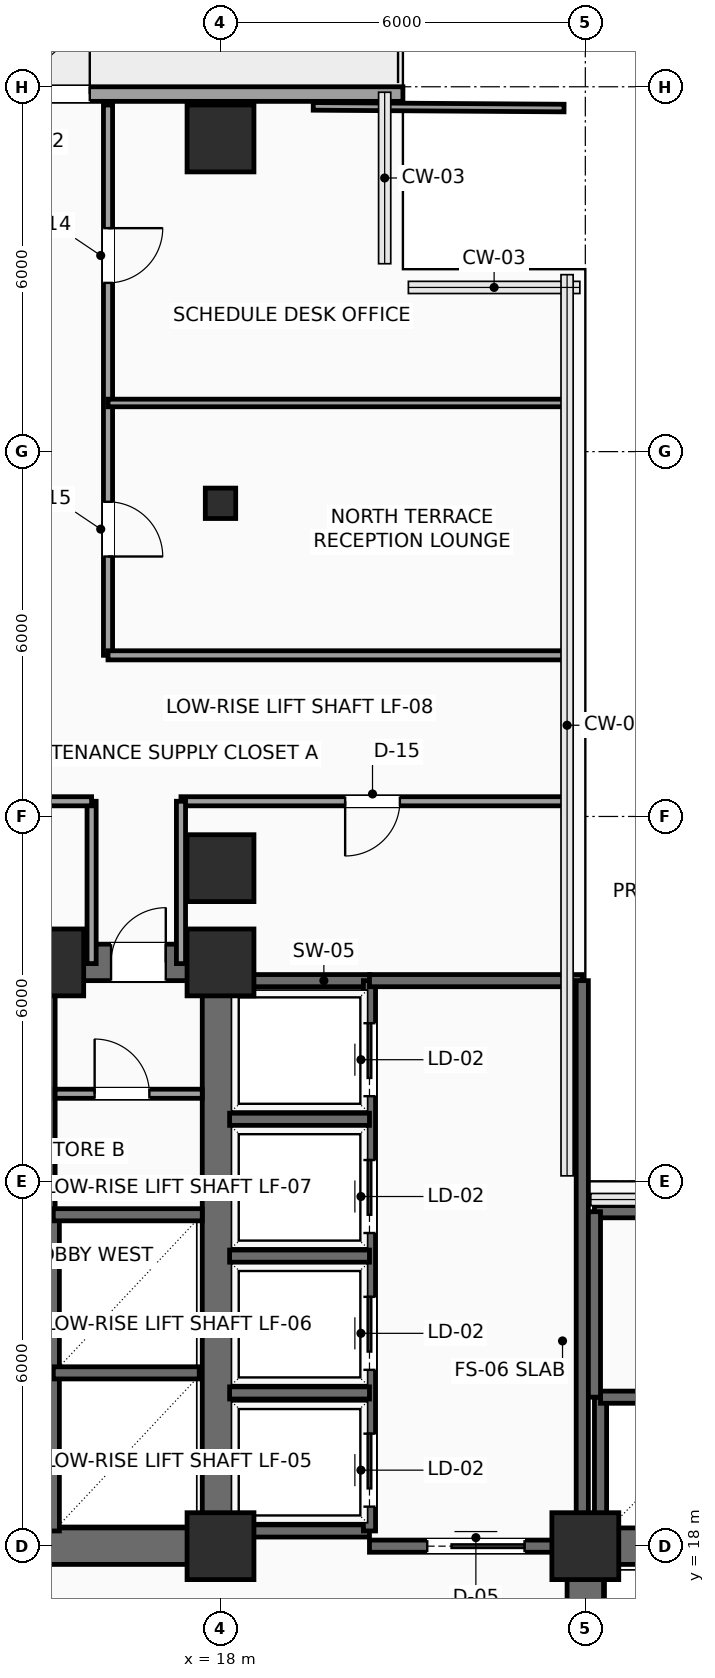
"""IFC4 building model, lengths in metres.
Left out: names, types, materials, properties, quantities, classifications, styles, units other than length and angle.
Written with IfcOpenShell. Run it as: python <this file> out.ifc"""

import sys

from ifc_helpers import new_model, si_unit, direction, frame, frame_2d, origin, origin_2d, place, context, subcontext, project, spatial, rectangle, hollow_rectangle, extrude, element, fill, save


model = new_model("IFC4")
c1 = context("Model", 3, precision=1e-05, world=origin(), true_north=direction((0.0, 1.0)))
c2 = subcontext(c1, "Body", "Model", "MODEL_VIEW")
j1 = project(units=[si_unit("LENGTHUNIT", "METRE"), si_unit("PLANEANGLEUNIT", "RADIAN")], contexts=[c1])
p1 = place(None, origin())
s1 = spatial("IfcSite", under=j1, at=p1, CompositionType="ELEMENT")
p2 = place(p1, origin())
s2 = spatial("IfcBuilding", under=s1, at=p2, CompositionType="ELEMENT")
p3 = place(p2, frame((0.0, 0.0, 99.6)))
s3 = spatial("IfcBuildingStorey", under=s2, at=p3, CompositionType="ELEMENT", Elevation=99.6)
for number, where, z_axis, x_axis in (
    (1, (18.0, 18.0, 0.0), (0.0, 0.0, 1.0), (1.0, 0.0, 0.0)),
    (2, (15.2, 27.6, 0.0), (0.0, 0.0, 1.0), (1.0, 0.0, 0.0)),
    (3, (18.0, 27.6, 0.0), (0.0, 0.0, 1.0), (1.0, 0.0, 0.0)),
    (4, (24.0, 18.0, 0.0), (0.0, 0.0, 1.0), (1.0, 0.0, 0.0)),
    (5, (18.0, 29.15, 0.0), (0.0, 0.0, 1.0), (1.0, 0.0, 0.0)),
):
    element("IfcColumn", number, at=place(p3, frame(where, z_axis=z_axis, x_axis=x_axis)), inside=s3, PredefinedType="COLUMN", context=c2, shape_type="SweptSolid", body=[
        extrude(rectangle(XDim=1.1, YDim=1.1, at=origin_2d()), origin(), (0.0, 0.0, 1.0), 3.75),
    ])
p4 = place(p3, frame((18.0, 35.15, 0.0), z_axis=(0.0, 0.0, 1.0), x_axis=(1.0, 0.0, 0.0)))
e6 = element("IfcColumn", 6, at=p4, inside=s3, PredefinedType="COLUMN", context=c2, shape_type="SweptSolid", body=[
    extrude(hollow_rectangle(XDim=0.5, YDim=0.5, WallThickness=0.025, InnerFilletRadius=0.025, OuterFilletRadius=0.04, at=origin_2d()), origin(), (0.0, 0.0, 1.0), 3.75),
])
p5 = place(p3, frame((18.0, 41.15, 0.0), z_axis=(0.0, 0.0, 1.0), x_axis=(1.0, 0.0, 0.0)))
e7 = element("IfcColumn", 7, at=p5, inside=s3, PredefinedType="COLUMN", context=c2, shape_type="SweptSolid", body=[
    extrude(rectangle(XDim=1.1, YDim=1.1, at=origin_2d()), origin(), (0.0, 0.0, 1.0), 3.75),
])
p6 = place(p3, frame((3.0, 41.88, 0.0), z_axis=(0.0, 0.0, 1.0), x_axis=(1.0, 0.0, 0.0)))
e8 = element("IfcWall", 8, at=p6, inside=s3, PredefinedType="SOLIDWALL", context=c2, shape_type="SweptSolid", body=[
    extrude(rectangle(XDim=18.0, YDim=0.24, at=frame_2d((9.0, 0.0))), origin(), (0.0, 0.0, 1.0), 3.525),
])
p7 = place(p6, frame((11.05, 0.0, 0.0)))
e9 = element("IfcOpeningElement", 9, at=p7, cuts=e8, PredefinedType="OPENING", context=c2, shape_type="SweptSolid", body=[
    extrude(rectangle(XDim=1.8, YDim=2.4, at=frame_2d((0.9, 1.2))), frame((0.0, 0.13, 0.0), z_axis=(0.0, -1.0, 0.0), x_axis=(1.0, 0.0, 0.0)), (0.0, 0.0, 1.0), 0.26),
])
p8 = place(p3, frame((6.0, 18.0, 0.0), z_axis=(0.0, 0.0, 1.0), x_axis=(1.0, 0.0, 0.0)))
e10 = element("IfcWall", 10, at=p8, inside=s3, PredefinedType="SHEAR", context=c2, shape_type="SweptSolid", body=[
    extrude(rectangle(XDim=12.0, YDim=0.6, at=frame_2d((6.0, 0.0))), origin(), (0.0, 0.0, 1.0), 3.525),
])
p9 = place(p8, frame((7.15, 0.0, 0.0)))
e11 = element("IfcOpeningElement", 11, at=p9, cuts=e10, PredefinedType="OPENING", context=c2, shape_type="SweptSolid", body=[
    extrude(rectangle(XDim=1.6, YDim=2.3, at=frame_2d((0.8, 1.15))), frame((0.0, 0.31, 0.0), z_axis=(0.0, -1.0, 0.0), x_axis=(1.0, 0.0, 0.0)), (0.0, 0.0, 1.0), 0.62),
])
p10 = place(p3, frame((6.0, 27.6, 0.0), z_axis=(0.0, 0.0, 1.0), x_axis=(1.0, 0.0, 0.0)))
e12 = element("IfcWall", 12, at=p10, inside=s3, PredefinedType="SHEAR", context=c2, shape_type="SweptSolid", body=[
    extrude(rectangle(XDim=12.0, YDim=0.6, at=frame_2d((6.0, 0.0))), origin(), (0.0, 0.0, 1.0), 3.525),
])
p11 = place(p10, frame((10.2, 0.0, 0.0)))
e13 = element("IfcOpeningElement", 13, at=p11, cuts=e12, PredefinedType="OPENING", context=c2, shape_type="SweptSolid", body=[
    extrude(rectangle(XDim=0.9, YDim=2.15, at=frame_2d((0.45, 1.075))), frame((0.0, 0.31, 0.0), z_axis=(0.0, -1.0, 0.0), x_axis=(1.0, 0.0, 0.0)), (0.0, 0.0, 1.0), 0.62),
])
for number, where, z_axis, x_axis in (
    (14, (18.0, 18.0, 0.0), (0.0, 0.0, 1.0), (0.0, 1.0, 0.0)),
    (15, (24.0, 18.0, 0.0), (0.0, 0.0, 1.0), (1.0, 0.0, 0.0)),
):
    element("IfcWall", number, at=place(p3, frame(where, z_axis=z_axis, x_axis=x_axis)), inside=s3, PredefinedType="SHEAR", context=c2, shape_type="SweptSolid", body=[
        extrude(rectangle(XDim=9.6, YDim=0.6, at=frame_2d((4.8, 0.0))), origin(), (0.0, 0.0, 1.0), 3.525),
    ])
p12 = place(p3, frame((24.0, 6.0, 0.0), z_axis=(0.0, 0.0, 1.0), x_axis=(0.0, 1.0, 0.0)))
e16 = element("IfcWall", 16, at=p12, inside=s3, PredefinedType="SHEAR", context=c2, shape_type="SweptSolid", body=[
    extrude(rectangle(XDim=12.0, YDim=0.6, at=frame_2d((6.0, 0.0))), origin(), (0.0, 0.0, 1.0), 3.525),
])
p13 = place(p12, frame((7.15, 0.0, 0.0)))
e17 = element("IfcOpeningElement", 17, at=p13, cuts=e16, PredefinedType="OPENING", context=c2, shape_type="SweptSolid", body=[
    extrude(rectangle(XDim=1.6, YDim=2.3, at=frame_2d((0.8, 1.15))), frame((0.0, 0.31, 0.0), z_axis=(0.0, -1.0, 0.0), x_axis=(1.0, 0.0, 0.0)), (0.0, 0.0, 1.0), 0.62),
])
p14 = place(p3, frame((15.18, 23.26, 0.0), z_axis=(0.0, 0.0, 1.0), x_axis=(0.0, 1.0, 0.0)))
e18 = element("IfcWall", 18, at=p14, inside=s3, PredefinedType="SHEAR", context=c2, shape_type="SweptSolid", body=[
    extrude(rectangle(XDim=4.04, YDim=0.2, at=frame_2d((2.02, 0.0))), origin(), (0.0, 0.0, 1.0), 3.525),
])
p15 = place(p3, frame((15.25, 18.25, 0.0), z_axis=(0.0, 0.0, 1.0), x_axis=(0.0, 1.0, 0.0)))
e19 = element("IfcWall", 19, at=p15, inside=s3, PredefinedType="SHEAR", context=c2, shape_type="SweptSolid", body=[
    extrude(rectangle(XDim=5.2, YDim=0.2, at=frame_2d((2.6, 0.0))), origin(), (0.0, 0.0, 1.0), 3.525),
])
p16 = place(p3, frame((15.25, 20.85, 0.0), z_axis=(0.0, 0.0, 1.0), x_axis=(1.0, 0.0, 0.0)))
e20 = element("IfcWall", 20, at=p16, inside=s3, PredefinedType="SHEAR", context=c2, shape_type="SweptSolid", body=[
    extrude(rectangle(XDim=2.4, YDim=0.2, at=frame_2d((1.2, 0.0))), origin(), (0.0, 0.0, 1.0), 3.525),
])
p17 = place(p3, frame((15.25, 23.45, 0.0), z_axis=(0.0, 0.0, 1.0), x_axis=(1.0, 0.0, 0.0)))
e21 = element("IfcWall", 21, at=p17, inside=s3, PredefinedType="SHEAR", context=c2, shape_type="SweptSolid", body=[
    extrude(rectangle(XDim=2.45, YDim=0.2, at=frame_2d((1.225, 0.0))), origin(), (0.0, 0.0, 1.0), 3.525),
])
p18 = place(p3, frame((15.28, 25.44, 0.0), z_axis=(0.0, 0.0, 1.0), x_axis=(1.0, 0.0, 0.0)))
e22 = element("IfcWall", 22, at=p18, inside=s3, PredefinedType="PARTITIONING", context=c2, shape_type="SweptSolid", body=[
    extrude(rectangle(XDim=2.42, YDim=0.15, at=frame_2d((1.21, 0.0))), origin(), (0.0, 0.0, 1.0), 3.525),
])
p19 = place(p18, frame((0.65, 0.0, 0.0)))
e23 = element("IfcOpeningElement", 23, at=p19, cuts=e22, PredefinedType="OPENING", context=c2, shape_type="SweptSolid", body=[
    extrude(rectangle(XDim=0.9, YDim=2.15, at=frame_2d((0.45, 1.075))), frame((0.0, 0.085, 0.0), z_axis=(0.0, -1.0, 0.0), x_axis=(1.0, 0.0, 0.0)), (0.0, 0.0, 1.0), 0.17),
])
for number, where, z_axis, x_axis in (
    (24, (18.1, 27.3, 0.0), (0.0, 0.0, 1.0), (1.0, 0.0, 0.0)),
    (25, (18.1, 18.25, 0.0), (0.0, 0.0, 1.0), (1.0, 0.0, 0.0)),
):
    element("IfcWall", number, at=place(p3, frame(where, z_axis=z_axis, x_axis=x_axis)), inside=s3, PredefinedType="SHEAR", context=c2, shape_type="SweptSolid", body=[
        extrude(rectangle(XDim=2.35, YDim=0.2, at=frame_2d((1.175, 0.0))), origin(), (0.0, 0.0, 1.0), 3.525),
    ])
p20 = place(p3, frame((20.45, 18.25, 0.0), z_axis=(0.0, 0.0, 1.0), x_axis=(0.0, 1.0, 0.0)))
e26 = element("IfcWall", 26, at=p20, inside=s3, PredefinedType="SHEAR", context=c2, shape_type="SweptSolid", body=[
    extrude(rectangle(XDim=9.05, YDim=0.2, at=frame_2d((4.525, 0.0))), origin(), (0.0, 0.0, 1.0), 3.525),
])
p21 = place(p20, frame((0.4, 0.0, 0.0)))
e27 = element("IfcOpeningElement", 27, at=p21, cuts=e26, PredefinedType="OPENING", context=c2, shape_type="SweptSolid", body=[
    extrude(rectangle(XDim=1.2, YDim=2.2, at=frame_2d((0.6, 1.1))), frame((0.0, 0.11, 0.0), z_axis=(0.0, -1.0, 0.0), x_axis=(1.0, 0.0, 0.0)), (0.0, 0.0, 1.0), 0.22),
])
p22 = place(p20, frame((2.65, 0.0, 0.0)))
e28 = element("IfcOpeningElement", 28, at=p22, cuts=e26, PredefinedType="OPENING", context=c2, shape_type="SweptSolid", body=[
    extrude(rectangle(XDim=1.2, YDim=2.2, at=frame_2d((0.6, 1.1))), frame((0.0, 0.11, 0.0), z_axis=(0.0, -1.0, 0.0), x_axis=(1.0, 0.0, 0.0)), (0.0, 0.0, 1.0), 0.22),
])
p23 = place(p20, frame((4.9, 0.0, 0.0)))
e29 = element("IfcOpeningElement", 29, at=p23, cuts=e26, PredefinedType="OPENING", context=c2, shape_type="SweptSolid", body=[
    extrude(rectangle(XDim=1.2, YDim=2.2, at=frame_2d((0.6, 1.1))), frame((0.0, 0.11, 0.0), z_axis=(0.0, -1.0, 0.0), x_axis=(1.0, 0.0, 0.0)), (0.0, 0.0, 1.0), 0.22),
])
p24 = place(p20, frame((7.15, 0.0, 0.0)))
e30 = element("IfcOpeningElement", 30, at=p24, cuts=e26, PredefinedType="OPENING", context=c2, shape_type="SweptSolid", body=[
    extrude(rectangle(XDim=1.2, YDim=2.2, at=frame_2d((0.6, 1.1))), frame((0.0, 0.11, 0.0), z_axis=(0.0, -1.0, 0.0), x_axis=(1.0, 0.0, 0.0)), (0.0, 0.0, 1.0), 0.22),
])
for number, where, z_axis, x_axis in (
    (31, (18.15, 20.52, 0.0), (0.0, 0.0, 1.0), (1.0, 0.0, 0.0)),
    (32, (18.15, 22.77, 0.0), (0.0, 0.0, 1.0), (1.0, 0.0, 0.0)),
    (33, (18.15, 25.02, 0.0), (0.0, 0.0, 1.0), (1.0, 0.0, 0.0)),
):
    element("IfcWall", number, at=place(p3, frame(where, z_axis=z_axis, x_axis=x_axis)), inside=s3, PredefinedType="SHEAR", context=c2, shape_type="SweptSolid", body=[
        extrude(rectangle(XDim=2.3, YDim=0.2, at=frame_2d((1.15, 0.0))), origin(), (0.0, 0.0, 1.0), 3.525),
    ])
p25 = place(p3, frame((20.45, 18.0, 0.0), z_axis=(0.0, 0.0, 1.0), x_axis=(1.0, 0.0, 0.0)))
e34 = element("IfcWall", 34, at=p25, inside=s3, PredefinedType="SHEAR", context=c2, shape_type="SweptSolid", body=[
    extrude(rectangle(XDim=3.5, YDim=0.2, at=frame_2d((1.75, 0.0))), origin(), (0.0, 0.0, 1.0), 3.525),
])
p26 = place(p25, frame((0.95, 0.0, 0.0)))
e35 = element("IfcOpeningElement", 35, at=p26, cuts=e34, PredefinedType="OPENING", context=c2, shape_type="SweptSolid", body=[
    extrude(rectangle(XDim=1.6, YDim=2.3, at=frame_2d((0.8, 1.15))), frame((0.0, 0.11, 0.0), z_axis=(0.0, -1.0, 0.0), x_axis=(1.0, 0.0, 0.0)), (0.0, 0.0, 1.0), 0.22),
])
p27 = place(p3, frame((20.45, 27.3, 0.0), z_axis=(0.0, 0.0, 1.0), x_axis=(1.0, 0.0, 0.0)))
e36 = element("IfcWall", 36, at=p27, inside=s3, PredefinedType="SHEAR", context=c2, shape_type="SweptSolid", body=[
    extrude(rectangle(XDim=3.5, YDim=0.2, at=frame_2d((1.75, 0.0))), origin(), (0.0, 0.0, 1.0), 3.525),
])
p28 = place(p3, frame((23.95, 18.0, 0.0), z_axis=(0.0, 0.0, 1.0), x_axis=(0.0, 1.0, 0.0)))
e37 = element("IfcWall", 37, at=p28, inside=s3, PredefinedType="SHEAR", context=c2, shape_type="SweptSolid", body=[
    extrude(rectangle(XDim=9.3, YDim=0.2, at=frame_2d((4.65, 0.0))), origin(), (0.0, 0.0, 1.0), 3.525),
])
p29 = place(p3, frame((24.25, 18.1, 0.0), z_axis=(0.0, 0.0, 1.0), x_axis=(0.0, 1.0, 0.0)))
e38 = element("IfcWall", 38, at=p29, inside=s3, PredefinedType="SHEAR", context=c2, shape_type="SweptSolid", body=[
    extrude(rectangle(XDim=2.35, YDim=0.2, at=frame_2d((1.175, 0.0))), origin(), (0.0, 0.0, 1.0), 3.525),
])
p30 = place(p3, frame((24.25, 20.45, 0.0), z_axis=(0.0, 0.0, 1.0), x_axis=(1.0, 0.0, 0.0)))
e39 = element("IfcWall", 39, at=p30, inside=s3, PredefinedType="SHEAR", context=c2, shape_type="SweptSolid", body=[
    extrude(rectangle(XDim=9.05, YDim=0.2, at=frame_2d((4.525, 0.0))), origin(), (0.0, 0.0, 1.0), 3.525),
])
p31 = place(p3, frame((24.15, 23.5, 0.0), z_axis=(0.0, 0.0, 1.0), x_axis=(1.0, 0.0, 0.0)))
e40 = element("IfcWall", 40, at=p31, inside=s3, PredefinedType="SHEAR", context=c2, shape_type="SweptSolid", body=[
    extrude(rectangle(XDim=9.15, YDim=0.2, at=frame_2d((4.575, 0.0))), origin(), (0.0, 0.0, 1.0), 3.525),
])
p32 = place(p3, frame((24.15, 20.45, 0.0), z_axis=(0.0, 0.0, 1.0), x_axis=(0.0, 1.0, 0.0)))
e41 = element("IfcWall", 41, at=p32, inside=s3, PredefinedType="SHEAR", context=c2, shape_type="SweptSolid", body=[
    extrude(rectangle(XDim=3.05, YDim=0.2, at=frame_2d((1.525, 0.0))), origin(), (0.0, 0.0, 1.0), 3.525),
])
p33 = place(p3, frame((16.15, 41.7, 0.0), z_axis=(0.0, 0.0, 1.0), x_axis=(0.0, -1.0, 0.0)))
e42 = element("IfcWall", 42, at=p33, inside=s3, PredefinedType="PARTITIONING", context=c2, shape_type="SweptSolid", body=[
    extrude(rectangle(XDim=9.05, YDim=0.15, at=frame_2d((4.525, 0.0))), origin(), (0.0, 0.0, 1.0), 3.525),
])
p34 = place(p33, frame((6.525, 0.0, 0.0)))
e43 = element("IfcOpeningElement", 43, at=p34, cuts=e42, PredefinedType="OPENING", context=c2, shape_type="SweptSolid", body=[
    extrude(rectangle(XDim=0.9, YDim=2.1, at=frame_2d((0.45, 1.05))), frame((0.0, 0.085, 0.0), z_axis=(0.0, -1.0, 0.0), x_axis=(1.0, 0.0, 0.0)), (0.0, 0.0, 1.0), 0.17),
])
p35 = place(p33, frame((2.025, 0.0, 0.0)))
e44 = element("IfcOpeningElement", 44, at=p35, cuts=e42, PredefinedType="OPENING", context=c2, shape_type="SweptSolid", body=[
    extrude(rectangle(XDim=0.9, YDim=2.1, at=frame_2d((0.45, 1.05))), frame((0.0, 0.085, 0.0), z_axis=(0.0, -1.0, 0.0), x_axis=(1.0, 0.0, 0.0)), (0.0, 0.0, 1.0), 0.17),
])
p36 = place(p3, frame((16.15, 32.65, 0.0), z_axis=(0.0, 0.0, 1.0), x_axis=(1.0, 0.0, 0.0)))
e45 = element("IfcWall", 45, at=p36, inside=s3, PredefinedType="PARTITIONING", context=c2, shape_type="SweptSolid", body=[
    extrude(rectangle(XDim=7.55, YDim=0.15, at=frame_2d((3.775, 0.0))), origin(), (0.0, 0.0, 1.0), 3.525),
])
p37 = place(p3, frame((23.7, 30.25, 0.0), z_axis=(0.0, 0.0, 1.0), x_axis=(-1.0, 0.0, 0.0)))
e46 = element("IfcWall", 46, at=p37, inside=s3, PredefinedType="PARTITIONING", context=c2, shape_type="SweptSolid", body=[
    extrude(rectangle(XDim=6.35, YDim=0.15, at=frame_2d((3.175, 0.0))), origin(), (0.0, 0.0, 1.0), 3.525),
])
p38 = place(p37, frame((2.75, 0.0, 0.0)))
e47 = element("IfcOpeningElement", 47, at=p38, cuts=e46, PredefinedType="OPENING", context=c2, shape_type="SweptSolid", body=[
    extrude(rectangle(XDim=0.9, YDim=2.1, at=frame_2d((0.45, 1.05))), frame((0.0, 0.085, 0.0), z_axis=(0.0, -1.0, 0.0), x_axis=(1.0, 0.0, 0.0)), (0.0, 0.0, 1.0), 0.17),
])
for number, where, z_axis, x_axis in (
    (48, (17.35, 30.25, 0.0), (0.0, 0.0, 1.0), (0.0, -1.0, 0.0)),
    (49, (15.88, 27.58, 0.0), (0.0, 0.0, 1.0), (0.0, 1.0, 0.0)),
):
    element("IfcWall", number, at=place(p3, frame(where, z_axis=z_axis, x_axis=x_axis)), inside=s3, PredefinedType="PARTITIONING", context=c2, shape_type="SweptSolid", body=[
        extrude(rectangle(XDim=2.67, YDim=0.15, at=frame_2d((1.335, 0.0))), origin(), (0.0, 0.0, 1.0), 3.525),
    ])
p39 = place(p3, frame((15.88, 30.25, 0.0), z_axis=(0.0, 0.0, 1.0), x_axis=(-1.0, 0.0, 0.0)))
e50 = element("IfcWall", 50, at=p39, inside=s3, PredefinedType="PARTITIONING", context=c2, shape_type="SweptSolid", body=[
    extrude(rectangle(XDim=10.63, YDim=0.15, at=frame_2d((5.315, 0.0))), origin(), (0.0, 0.0, 1.0), 3.525),
])
p40 = place(p39, frame((6.13, 0.0, 0.0)))
e51 = element("IfcOpeningElement", 51, at=p40, cuts=e50, PredefinedType="OPENING", context=c2, shape_type="SweptSolid", body=[
    extrude(rectangle(XDim=0.9, YDim=2.1, at=frame_2d((0.45, 1.05))), frame((0.0, 0.085, 0.0), z_axis=(0.0, -1.0, 0.0), x_axis=(1.0, 0.0, 0.0)), (0.0, 0.0, 1.0), 0.17),
])
p41 = place(p3, frame((16.15, 36.8, 0.0), z_axis=(0.0, 0.0, 1.0), x_axis=(1.0, 0.0, 0.0)))
e52 = element("IfcWall", 52, at=p41, inside=s3, PredefinedType="PARTITIONING", context=c2, shape_type="SweptSolid", body=[
    extrude(rectangle(XDim=7.55, YDim=0.125, at=frame_2d((3.775, 0.0))), origin(), (0.0, 0.0, 1.0), 3.525),
])
p42 = place(p3, frame((19.525, 41.677, 0.0), z_axis=(0.0, 0.0, 1.0), x_axis=(0.999977636256, -0.006687823917, 0.0)))
e53 = element("IfcWall", 53, at=p42, inside=s3, PredefinedType="PARTITIONING", context=c2, shape_type="SweptSolid", body=[
    extrude(rectangle(XDim=4.125, YDim=0.125, at=frame_2d((2.062, 0.0))), origin(), (0.0, 0.0, 1.0), 3.525),
])
p43 = place(p7, origin())
e54 = element("IfcDoor", 54, at=p43, inside=s3, OperationType="DOUBLE_DOOR_SINGLE_SWING", PredefinedType="DOOR", context=c2, shape_type="SweptSolid", body=[
    extrude(rectangle(XDim=1.8, YDim=2.4, at=frame_2d((0.9, 1.2))), frame((0.0, 0.025, 0.0), z_axis=(0.0, -1.0, 0.0), x_axis=(1.0, 0.0, 0.0)), (0.0, 0.0, 1.0), 0.05),
])
fill(e9, e54)
p44 = place(p11, origin())
e55 = element("IfcDoor", 55, at=p44, inside=s3, OperationType="SINGLE_SWING_RIGHT", PredefinedType="DOOR", context=c2, shape_type="SweptSolid", body=[
    extrude(rectangle(XDim=0.9, YDim=2.15, at=frame_2d((0.45, 1.075))), frame((0.0, 0.025, 0.0), z_axis=(0.0, -1.0, 0.0), x_axis=(1.0, 0.0, 0.0)), (0.0, 0.0, 1.0), 0.05),
])
fill(e13, e55)
p45 = place(p19, origin())
e56 = element("IfcDoor", 56, at=p45, inside=s3, OperationType="SINGLE_SWING_LEFT", PredefinedType="DOOR", context=c2, shape_type="SweptSolid", body=[
    extrude(rectangle(XDim=0.9, YDim=2.15, at=frame_2d((0.45, 1.075))), frame((0.0, 0.025, 0.0), z_axis=(0.0, -1.0, 0.0), x_axis=(1.0, 0.0, 0.0)), (0.0, 0.0, 1.0), 0.05),
])
fill(e23, e56)
p46 = place(p21, origin())
e57 = element("IfcDoor", 57, at=p46, inside=s3, OperationType="SLIDING_TO_RIGHT", PredefinedType="DOOR", context=c2, shape_type="SweptSolid", body=[
    extrude(rectangle(XDim=1.2, YDim=2.2, at=frame_2d((0.6, 1.1))), frame((0.0, 0.025, 0.0), z_axis=(0.0, -1.0, 0.0), x_axis=(1.0, 0.0, 0.0)), (0.0, 0.0, 1.0), 0.05),
])
fill(e27, e57)
p47 = place(p22, origin())
e58 = element("IfcDoor", 58, at=p47, inside=s3, OperationType="SLIDING_TO_RIGHT", PredefinedType="DOOR", context=c2, shape_type="SweptSolid", body=[
    extrude(rectangle(XDim=1.2, YDim=2.2, at=frame_2d((0.6, 1.1))), frame((0.0, 0.025, 0.0), z_axis=(0.0, -1.0, 0.0), x_axis=(1.0, 0.0, 0.0)), (0.0, 0.0, 1.0), 0.05),
])
fill(e28, e58)
p48 = place(p23, origin())
e59 = element("IfcDoor", 59, at=p48, inside=s3, OperationType="SLIDING_TO_RIGHT", PredefinedType="DOOR", context=c2, shape_type="SweptSolid", body=[
    extrude(rectangle(XDim=1.2, YDim=2.2, at=frame_2d((0.6, 1.1))), frame((0.0, 0.025, 0.0), z_axis=(0.0, -1.0, 0.0), x_axis=(1.0, 0.0, 0.0)), (0.0, 0.0, 1.0), 0.05),
])
fill(e29, e59)
p49 = place(p24, origin())
e60 = element("IfcDoor", 60, at=p49, inside=s3, OperationType="SLIDING_TO_RIGHT", PredefinedType="DOOR", context=c2, shape_type="SweptSolid", body=[
    extrude(rectangle(XDim=1.2, YDim=2.2, at=frame_2d((0.6, 1.1))), frame((0.0, 0.025, 0.0), z_axis=(0.0, -1.0, 0.0), x_axis=(1.0, 0.0, 0.0)), (0.0, 0.0, 1.0), 0.05),
])
fill(e30, e60)
p50 = place(p26, origin())
e61 = element("IfcDoor", 61, at=p50, inside=s3, OperationType="DOUBLE_DOOR_SLIDING", PredefinedType="DOOR", context=c2, shape_type="SweptSolid", body=[
    extrude(rectangle(XDim=1.6, YDim=2.3, at=frame_2d((0.8, 1.15))), frame((0.0, 0.025, 0.0), z_axis=(0.0, -1.0, 0.0), x_axis=(1.0, 0.0, 0.0)), (0.0, 0.0, 1.0), 0.05),
])
fill(e35, e61)
p51 = place(p34, origin())
e62 = element("IfcDoor", 62, at=p51, inside=s3, OperationType="SINGLE_SWING_RIGHT", PredefinedType="DOOR", context=c2, shape_type="SweptSolid", body=[
    extrude(rectangle(XDim=0.9, YDim=2.1, at=frame_2d((0.45, 1.05))), frame((0.0, 0.025, 0.0), z_axis=(0.0, -1.0, 0.0), x_axis=(1.0, 0.0, 0.0)), (0.0, 0.0, 1.0), 0.05),
])
fill(e43, e62)
p52 = place(p35, origin())
e63 = element("IfcDoor", 63, at=p52, inside=s3, OperationType="SINGLE_SWING_LEFT", PredefinedType="DOOR", context=c2, shape_type="SweptSolid", body=[
    extrude(rectangle(XDim=0.9, YDim=2.1, at=frame_2d((0.45, 1.05))), frame((0.0, 0.025, 0.0), z_axis=(0.0, -1.0, 0.0), x_axis=(1.0, 0.0, 0.0)), (0.0, 0.0, 1.0), 0.05),
])
fill(e44, e63)
p53 = place(p38, origin())
e64 = element("IfcDoor", 64, at=p53, inside=s3, OperationType="SINGLE_SWING_RIGHT", PredefinedType="DOOR", context=c2, shape_type="SweptSolid", body=[
    extrude(rectangle(XDim=0.9, YDim=2.1, at=frame_2d((0.45, 1.05))), frame((0.0, 0.025, 0.0), z_axis=(0.0, -1.0, 0.0), x_axis=(1.0, 0.0, 0.0)), (0.0, 0.0, 1.0), 0.05),
])
fill(e47, e64)
save(model, sys.argv[1])
